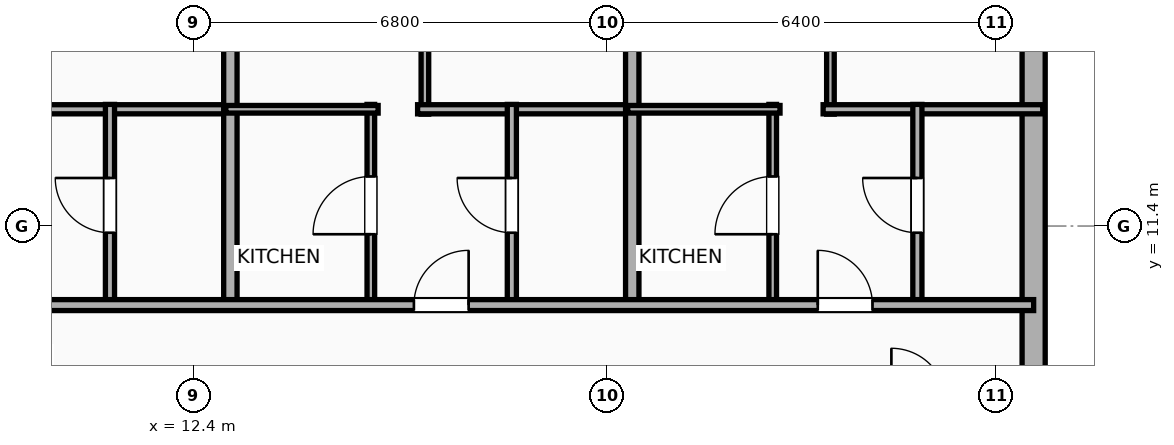
"""IFC4 building model, lengths in metres.
Left out: names, types, materials, properties, quantities, classifications, styles, units other than length and angle.
Written with IfcOpenShell. Run it as: python <this file> out.ifc"""

import sys

from ifc_helpers import new_model, si_unit, direction, frame, frame_2d, origin, place, context, subcontext, project, spatial, rectangle, extrude, element, fill, save


model = new_model("IFC4")
c1 = context("Model", 3, precision=1e-05, world=origin(), true_north=direction((0.0, 1.0)))
c2 = subcontext(c1, "Body", "Model", "MODEL_VIEW")
j1 = project(units=[si_unit("LENGTHUNIT", "METRE"), si_unit("PLANEANGLEUNIT", "RADIAN")], contexts=[c1])
p1 = place(None, origin())
s1 = spatial("IfcSite", under=j1, at=p1, CompositionType="ELEMENT")
p2 = place(p1, origin())
s2 = spatial("IfcBuilding", under=s1, at=p2, CompositionType="ELEMENT")
p3 = place(p2, frame((0.0, 0.0, 45.5)))
s3 = spatial("IfcBuildingStorey", under=s2, at=p3, CompositionType="ELEMENT", Elevation=45.5)
p4 = place(p3, frame((26.21, 18.381, 0.0), z_axis=(0.0, 0.0, 1.0), x_axis=(0.0, -1.0, 0.0)))
e1 = element("IfcWall", 1, at=p4, inside=s3, PredefinedType="ELEMENTEDWALL", context=c2, shape_type="SweptSolid", body=[
    extrude(rectangle(XDim=36.763, YDim=0.38, at=frame_2d((18.381, 0.0))), origin(), (0.0, 0.0, 1.0), 3.65),
])
p5 = place(p3, frame((9.47, 13.32, 0.0), z_axis=(0.0, 0.0, 1.0), x_axis=(1.0, 0.0, 0.0)))
e2 = element("IfcWall", 2, at=p5, inside=s3, PredefinedType="PLUMBINGWALL", context=c2, shape_type="SweptSolid", body=[
    extrude(rectangle(XDim=3.605, YDim=0.15, at=frame_2d((1.802, 0.0))), origin(), (0.0, 0.0, 1.0), 3.65),
])
p6 = place(p3, frame((11.02, 10.08, 0.0), z_axis=(0.0, 0.0, 1.0), x_axis=(0.0, 1.0, 0.0)))
e3 = element("IfcWall", 3, at=p6, inside=s3, PredefinedType="PLUMBINGWALL", context=c2, shape_type="SweptSolid", body=[
    extrude(rectangle(XDim=3.32, YDim=0.15, at=frame_2d((1.66, 0.0))), origin(), (0.0, 0.0, 1.0), 3.65),
])
p7 = place(p6, frame((1.21, 0.0, 0.0)))
e4 = element("IfcOpeningElement", 4, at=p7, cuts=e3, PredefinedType="OPENING", context=c2, shape_type="SweptSolid", body=[
    extrude(rectangle(XDim=0.9, YDim=2.05, at=frame_2d((0.45, 1.025))), frame((0.0, 0.085, 0.0), z_axis=(0.0, -1.0, 0.0), x_axis=(1.0, 0.0, 0.0)), (0.0, 0.0, 1.0), 0.17),
])
p8 = place(p3, frame((13.0, 10.02, 0.0), z_axis=(0.0, 0.0, 1.0), x_axis=(0.0, 1.0, 0.0)))
e5 = element("IfcWall", 5, at=p8, inside=s3, PredefinedType="PARTITIONING", context=c2, shape_type="SweptSolid", body=[
    extrude(rectangle(XDim=12.19, YDim=0.22, at=frame_2d((6.095, 0.0))), origin(), (0.0, 0.0, 1.0), 3.65),
])
p9 = place(p3, frame((16.199, 13.24, 0.0), z_axis=(0.0, 0.0, 1.0), x_axis=(0.0, 1.0, 0.0)))
e6 = element("IfcWall", 6, at=p9, inside=s3, PredefinedType="PARTITIONING", context=c2, shape_type="SweptSolid", body=[
    extrude(rectangle(XDim=9.12, YDim=0.125, at=frame_2d((4.56, 0.0))), origin(), (0.0, 0.0, 1.0), 3.65),
])
p10 = place(p9, frame((1.739, 0.0, 0.0)))
e7 = element("IfcOpeningElement", 7, at=p10, cuts=e6, PredefinedType="OPENING", context=c2, shape_type="SweptSolid", body=[
    extrude(rectangle(XDim=0.9, YDim=2.05, at=frame_2d((0.45, 1.025))), frame((0.0, 0.073, 0.0), z_axis=(0.0, -1.0, 0.0), x_axis=(1.0, 0.0, 0.0)), (0.0, 0.0, 1.0), 0.145),
])
p11 = place(p3, frame((16.079, 13.32, 0.0), z_axis=(0.0, 0.0, 1.0), x_axis=(1.0, 0.0, 0.0)))
e8 = element("IfcWall", 8, at=p11, inside=s3, PredefinedType="PLUMBINGWALL", context=c2, shape_type="SweptSolid", body=[
    extrude(rectangle(XDim=3.605, YDim=0.15, at=frame_2d((1.802, 0.0))), origin(), (0.0, 0.0, 1.0), 3.65),
])
p12 = place(p3, frame((15.31, 10.08, 0.0), z_axis=(0.0, 0.0, 1.0), x_axis=(0.0, 1.0, 0.0)))
e9 = element("IfcWall", 9, at=p12, inside=s3, PredefinedType="PARTITIONING", context=c2, shape_type="SweptSolid", body=[
    extrude(rectangle(XDim=3.32, YDim=0.125, at=frame_2d((1.66, 0.0))), origin(), (0.0, 0.0, 1.0), 3.65),
])
p13 = place(p12, frame((1.185, 0.0, 0.0)))
e10 = element("IfcOpeningElement", 10, at=p13, cuts=e9, PredefinedType="OPENING", context=c2, shape_type="SweptSolid", body=[
    extrude(rectangle(XDim=0.95, YDim=2.05, at=frame_2d((0.475, 1.025))), frame((0.0, 0.073, 0.0), z_axis=(0.0, -1.0, 0.0), x_axis=(1.0, 0.0, 0.0)), (0.0, 0.0, 1.0), 0.145),
])
p14 = place(p3, frame((12.925, 13.32, 0.0), z_axis=(0.0, 0.0, 1.0), x_axis=(1.0, 0.0, 0.0)))
e11 = element("IfcWall", 11, at=p14, inside=s3, PredefinedType="PARTITIONING", context=c2, shape_type="SweptSolid", body=[
    extrude(rectangle(XDim=2.505, YDim=0.125, at=frame_2d((1.252, 0.0))), origin(), (0.0, 0.0, 1.0), 3.65),
])
p15 = place(p3, frame((17.629, 10.08, 0.0), z_axis=(0.0, 0.0, 1.0), x_axis=(0.0, 1.0, 0.0)))
e12 = element("IfcWall", 12, at=p15, inside=s3, PredefinedType="PLUMBINGWALL", context=c2, shape_type="SweptSolid", body=[
    extrude(rectangle(XDim=3.32, YDim=0.15, at=frame_2d((1.66, 0.0))), origin(), (0.0, 0.0, 1.0), 3.65),
])
p16 = place(p15, frame((1.21, 0.0, 0.0)))
e13 = element("IfcOpeningElement", 13, at=p16, cuts=e12, PredefinedType="OPENING", context=c2, shape_type="SweptSolid", body=[
    extrude(rectangle(XDim=0.9, YDim=2.05, at=frame_2d((0.45, 1.025))), frame((0.0, 0.085, 0.0), z_axis=(0.0, -1.0, 0.0), x_axis=(1.0, 0.0, 0.0)), (0.0, 0.0, 1.0), 0.17),
])
p17 = place(p3, frame((19.609, 10.02, 0.0), z_axis=(0.0, 0.0, 1.0), x_axis=(0.0, 1.0, 0.0)))
e14 = element("IfcWall", 14, at=p17, inside=s3, PredefinedType="PARTITIONING", context=c2, shape_type="SweptSolid", body=[
    extrude(rectangle(XDim=12.19, YDim=0.22, at=frame_2d((6.095, 0.0))), origin(), (0.0, 0.0, 1.0), 3.65),
])
p18 = place(p3, frame((22.868, 13.24, 0.0), z_axis=(0.0, 0.0, 1.0), x_axis=(0.0, 1.0, 0.0)))
e15 = element("IfcWall", 15, at=p18, inside=s3, PredefinedType="PARTITIONING", context=c2, shape_type="SweptSolid", body=[
    extrude(rectangle(XDim=9.026, YDim=0.125, at=frame_2d((4.513, 0.0))), origin(), (0.0, 0.0, 1.0), 2.94),
])
p19 = place(p18, frame((1.716, 0.0, 0.0)))
e16 = element("IfcOpeningElement", 16, at=p19, cuts=e15, PredefinedType="OPENING", context=c2, shape_type="SweptSolid", body=[
    extrude(rectangle(XDim=0.9, YDim=2.05, at=frame_2d((0.45, 1.025))), frame((0.0, 0.073, 0.0), z_axis=(0.0, -1.0, 0.0), x_axis=(1.0, 0.0, 0.0)), (0.0, 0.0, 1.0), 0.145),
])
p20 = place(p3, frame((22.748, 13.32, 0.0), z_axis=(0.0, 0.0, 1.0), x_axis=(1.0, 0.0, 0.0)))
e17 = element("IfcWall", 17, at=p20, inside=s3, PredefinedType="PLUMBINGWALL", context=c2, shape_type="SweptSolid", body=[
    extrude(rectangle(XDim=3.612, YDim=0.15, at=frame_2d((1.806, 0.0))), origin(), (0.0, 0.0, 1.0), 3.65),
])
p21 = place(p3, frame((21.919, 10.08, 0.0), z_axis=(0.0, 0.0, 1.0), x_axis=(0.0, 1.0, 0.0)))
e18 = element("IfcWall", 18, at=p21, inside=s3, PredefinedType="PARTITIONING", context=c2, shape_type="SweptSolid", body=[
    extrude(rectangle(XDim=3.32, YDim=0.125, at=frame_2d((1.66, 0.0))), origin(), (0.0, 0.0, 1.0), 3.65),
])
p22 = place(p21, frame((1.185, 0.0, 0.0)))
e19 = element("IfcOpeningElement", 19, at=p22, cuts=e18, PredefinedType="OPENING", context=c2, shape_type="SweptSolid", body=[
    extrude(rectangle(XDim=0.95, YDim=2.05, at=frame_2d((0.475, 1.025))), frame((0.0, 0.073, 0.0), z_axis=(0.0, -1.0, 0.0), x_axis=(1.0, 0.0, 0.0)), (0.0, 0.0, 1.0), 0.145),
])
p23 = place(p3, frame((19.534, 13.32, 0.0), z_axis=(0.0, 0.0, 1.0), x_axis=(1.0, 0.0, 0.0)))
e20 = element("IfcWall", 20, at=p23, inside=s3, PredefinedType="PARTITIONING", context=c2, shape_type="SweptSolid", body=[
    extrude(rectangle(XDim=2.505, YDim=0.125, at=frame_2d((1.252, 0.0))), origin(), (0.0, 0.0, 1.0), 3.65),
])
p24 = place(p3, frame((24.298, 10.08, 0.0), z_axis=(0.0, 0.0, 1.0), x_axis=(0.0, 1.0, 0.0)))
e21 = element("IfcWall", 21, at=p24, inside=s3, PredefinedType="PLUMBINGWALL", context=c2, shape_type="SweptSolid", body=[
    extrude(rectangle(XDim=3.32, YDim=0.15, at=frame_2d((1.66, 0.0))), origin(), (0.0, 0.0, 1.0), 3.65),
])
p25 = place(p24, frame((1.21, 0.0, 0.0)))
e22 = element("IfcOpeningElement", 22, at=p25, cuts=e21, PredefinedType="OPENING", context=c2, shape_type="SweptSolid", body=[
    extrude(rectangle(XDim=0.9, YDim=2.05, at=frame_2d((0.45, 1.025))), frame((0.0, 0.085, 0.0), z_axis=(0.0, -1.0, 0.0), x_axis=(1.0, 0.0, 0.0)), (0.0, 0.0, 1.0), 0.17),
])
p26 = place(p3, frame((-33.41, 10.1, 0.0), z_axis=(0.0, 0.0, 1.0), x_axis=(1.0, 0.0, 0.0)))
e23 = element("IfcWall", 23, at=p26, inside=s3, PredefinedType="PARTITIONING", context=c2, shape_type="SweptSolid", body=[
    extrude(rectangle(XDim=59.62, YDim=0.18, at=frame_2d((29.81, 0.0))), origin(), (0.0, 0.0, 1.0), 3.65),
])
p27 = place(p26, frame((3.354, 0.0, 0.0)))
e24 = element("IfcOpeningElement", 24, at=p27, cuts=e23, PredefinedType="OPENING", context=c2, shape_type="SweptSolid", body=[
    extrude(rectangle(XDim=1.15, YDim=2.05, at=frame_2d((0.575, 1.025))), frame((0.0, 0.1, 0.0), z_axis=(0.0, -1.0, 0.0), x_axis=(1.0, 0.0, 0.0)), (0.0, 0.0, 1.0), 0.2),
])
p28 = place(p26, frame((10.997, 0.0, 0.0)))
e25 = element("IfcOpeningElement", 25, at=p28, cuts=e23, PredefinedType="OPENING", context=c2, shape_type="SweptSolid", body=[
    extrude(rectangle(XDim=1.15, YDim=2.05, at=frame_2d((0.575, 1.025))), frame((0.0, 0.1, 0.0), z_axis=(0.0, -1.0, 0.0), x_axis=(1.0, 0.0, 0.0)), (0.0, 0.0, 1.0), 0.2),
])
p29 = place(p26, frame((20.232, 0.0, 0.0)))
e26 = element("IfcOpeningElement", 26, at=p29, cuts=e23, PredefinedType="OPENING", context=c2, shape_type="SweptSolid", body=[
    extrude(rectangle(XDim=1.15, YDim=2.05, at=frame_2d((0.575, 1.025))), frame((0.0, 0.1, 0.0), z_axis=(0.0, -1.0, 0.0), x_axis=(1.0, 0.0, 0.0)), (0.0, 0.0, 1.0), 0.2),
])
p30 = place(p26, frame((30.38, 0.0, 0.0)))
e27 = element("IfcOpeningElement", 27, at=p30, cuts=e23, PredefinedType="OPENING", context=c2, shape_type="SweptSolid", body=[
    extrude(rectangle(XDim=1.15, YDim=2.05, at=frame_2d((0.575, 1.025))), frame((0.0, 0.1, 0.0), z_axis=(0.0, -1.0, 0.0), x_axis=(1.0, 0.0, 0.0)), (0.0, 0.0, 1.0), 0.2),
])
p31 = place(p26, frame((40.998, 0.0, 0.0)))
e28 = element("IfcOpeningElement", 28, at=p31, cuts=e23, PredefinedType="OPENING", context=c2, shape_type="SweptSolid", body=[
    extrude(rectangle(XDim=1.15, YDim=2.05, at=frame_2d((0.575, 1.025))), frame((0.0, 0.1, 0.0), z_axis=(0.0, -1.0, 0.0), x_axis=(1.0, 0.0, 0.0)), (0.0, 0.0, 1.0), 0.2),
])
p32 = place(p26, frame((49.428, 0.0, 0.0)))
e29 = element("IfcOpeningElement", 29, at=p32, cuts=e23, PredefinedType="OPENING", context=c2, shape_type="SweptSolid", body=[
    extrude(rectangle(XDim=0.9, YDim=2.05, at=frame_2d((0.45, 1.025))), frame((0.0, 0.1, 0.0), z_axis=(0.0, -1.0, 0.0), x_axis=(1.0, 0.0, 0.0)), (0.0, 0.0, 1.0), 0.2),
])
p33 = place(p26, frame((56.07, 0.0, 0.0)))
e30 = element("IfcOpeningElement", 30, at=p33, cuts=e23, PredefinedType="OPENING", context=c2, shape_type="SweptSolid", body=[
    extrude(rectangle(XDim=0.9, YDim=2.05, at=frame_2d((0.45, 1.025))), frame((0.0, 0.1, 0.0), z_axis=(0.0, -1.0, 0.0), x_axis=(1.0, 0.0, 0.0)), (0.0, 0.0, 1.0), 0.2),
])
p34 = place(p7, origin())
e31 = element("IfcDoor", 31, at=p34, inside=s3, OperationType="SINGLE_SWING_RIGHT", PredefinedType="DOOR", context=c2, shape_type="SweptSolid", body=[
    extrude(rectangle(XDim=0.9, YDim=2.05, at=frame_2d((0.45, 1.025))), frame((0.0, 0.025, 0.0), z_axis=(0.0, -1.0, 0.0), x_axis=(1.0, 0.0, 0.0)), (0.0, 0.0, 1.0), 0.05),
])
fill(e4, e31)
p35 = place(p13, origin())
e32 = element("IfcDoor", 32, at=p35, inside=s3, OperationType="SINGLE_SWING_LEFT", PredefinedType="DOOR", context=c2, shape_type="SweptSolid", body=[
    extrude(rectangle(XDim=0.95, YDim=2.05, at=frame_2d((0.475, 1.025))), frame((0.0, 0.025, 0.0), z_axis=(0.0, -1.0, 0.0), x_axis=(1.0, 0.0, 0.0)), (0.0, 0.0, 1.0), 0.05),
])
fill(e10, e32)
p36 = place(p16, origin())
e33 = element("IfcDoor", 33, at=p36, inside=s3, OperationType="SINGLE_SWING_RIGHT", PredefinedType="DOOR", context=c2, shape_type="SweptSolid", body=[
    extrude(rectangle(XDim=0.9, YDim=2.05, at=frame_2d((0.45, 1.025))), frame((0.0, 0.025, 0.0), z_axis=(0.0, -1.0, 0.0), x_axis=(1.0, 0.0, 0.0)), (0.0, 0.0, 1.0), 0.05),
])
fill(e13, e33)
p37 = place(p22, origin())
e34 = element("IfcDoor", 34, at=p37, inside=s3, OperationType="SINGLE_SWING_LEFT", PredefinedType="DOOR", context=c2, shape_type="SweptSolid", body=[
    extrude(rectangle(XDim=0.95, YDim=2.05, at=frame_2d((0.475, 1.025))), frame((0.0, 0.025, 0.0), z_axis=(0.0, -1.0, 0.0), x_axis=(1.0, 0.0, 0.0)), (0.0, 0.0, 1.0), 0.05),
])
fill(e19, e34)
p38 = place(p25, origin())
e35 = element("IfcDoor", 35, at=p38, inside=s3, OperationType="SINGLE_SWING_RIGHT", PredefinedType="DOOR", context=c2, shape_type="SweptSolid", body=[
    extrude(rectangle(XDim=0.9, YDim=2.05, at=frame_2d((0.45, 1.025))), frame((0.0, 0.025, 0.0), z_axis=(0.0, -1.0, 0.0), x_axis=(1.0, 0.0, 0.0)), (0.0, 0.0, 1.0), 0.05),
])
fill(e22, e35)
p39 = place(p32, origin())
e36 = element("IfcDoor", 36, at=p39, inside=s3, OperationType="SINGLE_SWING_RIGHT", PredefinedType="DOOR", context=c2, shape_type="SweptSolid", body=[
    extrude(rectangle(XDim=0.9, YDim=2.05, at=frame_2d((0.45, 1.025))), frame((0.0, 0.025, 0.0), z_axis=(0.0, -1.0, 0.0), x_axis=(1.0, 0.0, 0.0)), (0.0, 0.0, 1.0), 0.05),
])
fill(e29, e36)
p40 = place(p33, origin())
e37 = element("IfcDoor", 37, at=p40, inside=s3, OperationType="SINGLE_SWING_LEFT", PredefinedType="DOOR", context=c2, shape_type="SweptSolid", body=[
    extrude(rectangle(XDim=0.9, YDim=2.05, at=frame_2d((0.45, 1.025))), frame((0.0, 0.025, 0.0), z_axis=(0.0, -1.0, 0.0), x_axis=(1.0, 0.0, 0.0)), (0.0, 0.0, 1.0), 0.05),
])
fill(e30, e37)
save(model, sys.argv[1])
